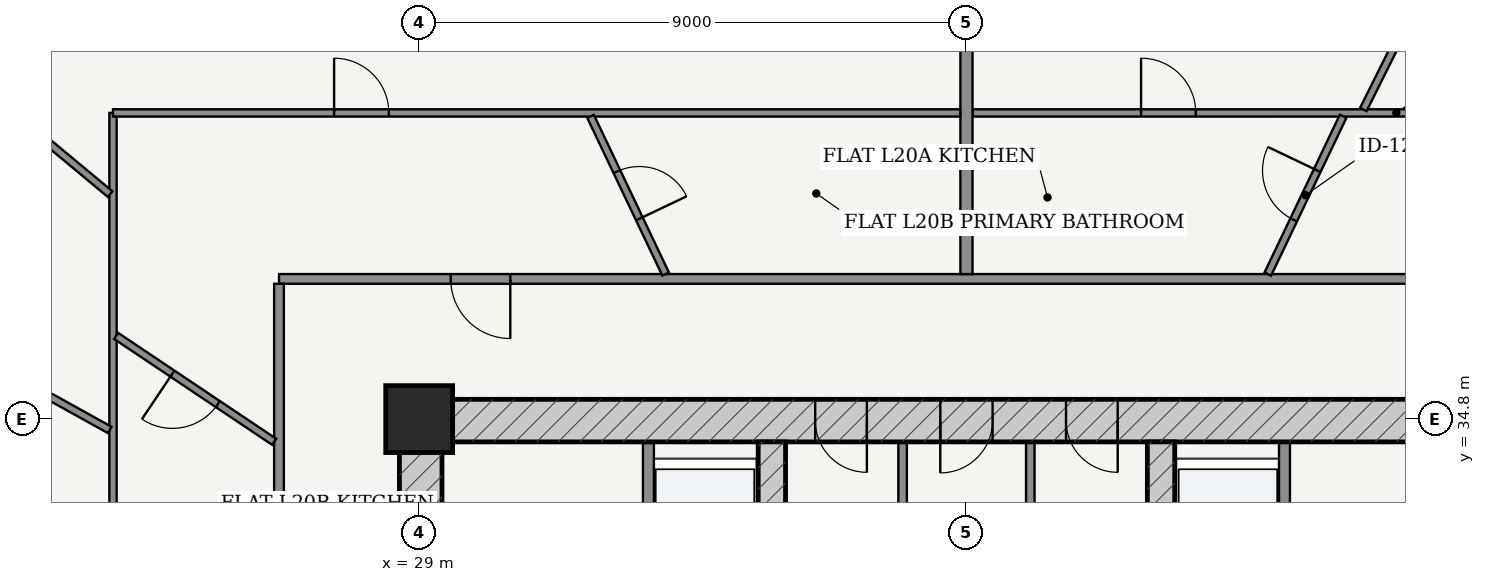
"""IFC4 building model, lengths in metres.
Left out: names, types, materials, properties, quantities, classifications, styles, units other than length and angle.
Written with IfcOpenShell. Run it as: python <this file> out.ifc"""

import sys

from ifc_helpers import new_model, si_unit, direction, frame, frame_2d, origin, origin_2d, place, context, subcontext, project, spatial, rectangle, extrude, source, transform, mapped, element, fill, save


model = new_model("IFC4")
c1 = context("Model", 3, precision=1e-05, world=origin(), true_north=direction((-0.2419218956, 0.970295726276)))
c2 = subcontext(c1, "Body", "Model", "MODEL_VIEW")
j1 = project(units=[si_unit("LENGTHUNIT", "METRE"), si_unit("PLANEANGLEUNIT", "RADIAN")], contexts=[c1])
p1 = place(None, origin())
s1 = spatial("IfcSite", under=j1, at=p1, CompositionType="ELEMENT")
p2 = place(p1, origin())
s2 = spatial("IfcBuilding", under=s1, at=p2, CompositionType="ELEMENT")
p3 = place(p2, frame((0.0, 0.0, 79.8)))
s3 = spatial("IfcBuildingStorey", under=s2, at=p3, CompositionType="ELEMENT", Elevation=79.8)
p4 = place(p3, frame((29.0, 34.8, 0.0), z_axis=(0.0, 0.0, 1.0), x_axis=(1.0, 0.0, 0.0)))
e1 = element("IfcColumn", 1, at=p4, inside=s3, PredefinedType="COLUMN", context=c2, shape_type="SweptSolid", body=[
    extrude(rectangle(XDim=1.1, YDim=1.1, at=origin_2d()), origin(), (0.0, 0.0, 1.0), 3.6),
])
p5 = place(p3, frame((28.675, 34.775, 0.0), z_axis=(0.0, 0.0, 1.0), x_axis=(1.0, 0.0, 0.0)))
e2 = element("IfcWall", 2, at=p5, inside=s3, PredefinedType="SHEAR", context=c2, shape_type="SweptSolid", body=[
    extrude(rectangle(XDim=18.65, YDim=0.7, at=frame_2d((9.325, 0.0))), origin(), (0.0, 0.0, 1.0), 3.325),
])
p6 = place(p5, frame((6.837, 0.0, 0.0)))
e3 = element("IfcOpeningElement", 3, at=p6, cuts=e2, PredefinedType="OPENING", context=c2, shape_type="SweptSolid", body=[
    extrude(rectangle(XDim=0.85, YDim=2.1, at=frame_2d((0.425, 1.05))), frame((0.0, 0.36, 0.0), z_axis=(0.0, -1.0, 0.0), x_axis=(1.0, 0.0, 0.0)), (0.0, 0.0, 1.0), 0.72),
])
p7 = place(p5, frame((8.895, 0.0, 0.0)))
e4 = element("IfcOpeningElement", 4, at=p7, cuts=e2, PredefinedType="OPENING", context=c2, shape_type="SweptSolid", body=[
    extrude(rectangle(XDim=0.86, YDim=2.1, at=frame_2d((0.43, 1.05))), frame((0.0, 0.36, 0.0), z_axis=(0.0, -1.0, 0.0), x_axis=(1.0, 0.0, 0.0)), (0.0, 0.0, 1.0), 0.72),
])
p8 = place(p5, frame((10.962, 0.0, 0.0)))
e5 = element("IfcOpeningElement", 5, at=p8, cuts=e2, PredefinedType="OPENING", context=c2, shape_type="SweptSolid", body=[
    extrude(rectangle(XDim=0.85, YDim=2.1, at=frame_2d((0.425, 1.05))), frame((0.0, 0.36, 0.0), z_axis=(0.0, -1.0, 0.0), x_axis=(1.0, 0.0, 0.0)), (0.0, 0.0, 1.0), 0.72),
])
p9 = place(p3, frame((29.025, 19.175, 0.0), z_axis=(0.0, 0.0, 1.0), x_axis=(0.0, 1.0, 0.0)))
e6 = element("IfcWall", 6, at=p9, inside=s3, PredefinedType="SHEAR", context=c2, shape_type="SweptSolid", body=[
    extrude(rectangle(XDim=15.25, YDim=0.7, at=frame_2d((7.625, 0.0))), origin(), (0.0, 0.0, 1.0), 3.325),
])
p10 = place(p9, frame((9.875, 0.0, 0.0)))
e7 = element("IfcOpeningElement", 7, at=p10, cuts=e6, PredefinedType="OPENING", context=c2, shape_type="SweptSolid", body=[
    extrude(rectangle(XDim=1.5, YDim=2.2, at=frame_2d((0.75, 1.1))), frame((0.0, 0.36, 0.0), z_axis=(0.0, -1.0, 0.0), x_axis=(1.0, 0.0, 0.0)), (0.0, 0.0, 1.0), 0.72),
])
p11 = place(p3, frame((34.8, 19.175, 0.0), z_axis=(0.0, 0.0, 1.0), x_axis=(0.0, 1.0, 0.0)))
e8 = element("IfcWall", 8, at=p11, inside=s3, PredefinedType="SHEAR", context=c2, shape_type="SweptSolid", body=[
    extrude(rectangle(XDim=15.25, YDim=0.45, at=frame_2d((7.625, 0.0))), origin(), (0.0, 0.0, 1.0), 3.325),
])
p12 = place(p11, frame((7.8, 0.0, 0.0)))
e9 = element("IfcOpeningElement", 9, at=p12, cuts=e8, PredefinedType="OPENING", context=c2, shape_type="SweptSolid", body=[
    extrude(rectangle(XDim=1.05, YDim=2.15, at=frame_2d((0.525, 1.075))), frame((0.0, 0.235, 0.0), z_axis=(0.0, -1.0, 0.0), x_axis=(1.0, 0.0, 0.0)), (0.0, 0.0, 1.0), 0.47),
])
p13 = place(p3, frame((41.2, 19.175, 0.0), z_axis=(0.0, 0.0, 1.0), x_axis=(0.0, 1.0, 0.0)))
e10 = element("IfcWall", 10, at=p13, inside=s3, PredefinedType="SHEAR", context=c2, shape_type="SweptSolid", body=[
    extrude(rectangle(XDim=15.25, YDim=0.45, at=frame_2d((7.625, 0.0))), origin(), (0.0, 0.0, 1.0), 3.325),
])
p14 = place(p13, frame((7.8, 0.0, 0.0)))
e11 = element("IfcOpeningElement", 11, at=p14, cuts=e10, PredefinedType="OPENING", context=c2, shape_type="SweptSolid", body=[
    extrude(rectangle(XDim=1.05, YDim=2.15, at=frame_2d((0.525, 1.075))), frame((0.0, 0.235, 0.0), z_axis=(0.0, -1.0, 0.0), x_axis=(1.0, 0.0, 0.0)), (0.0, 0.0, 1.0), 0.47),
])
p15 = place(p3, frame((32.77, 28.52, 0.0), z_axis=(0.0, 0.0, 1.0), x_axis=(0.0, 1.0, 0.0)))
e12 = element("IfcWall", 12, at=p15, inside=s3, PredefinedType="PARTITIONING", context=c2, shape_type="SweptSolid", body=[
    extrude(rectangle(XDim=5.905, YDim=0.18, at=frame_2d((2.953, 0.0))), origin(), (0.0, 0.0, 1.0), 3.325),
])
p16 = place(p15, frame((3.655, 0.0, 0.0)))
e13 = element("IfcOpeningElement", 13, at=p16, cuts=e12, PredefinedType="OPENING", context=c2, shape_type="SweptSolid", body=[
    extrude(rectangle(XDim=1.15, YDim=2.2, at=frame_2d((0.575, 1.1))), frame((0.0, 0.1, 0.0), z_axis=(0.0, -1.0, 0.0), x_axis=(1.0, 0.0, 0.0)), (0.0, 0.0, 1.0), 0.2),
])
p17 = place(p15, frame((0.73, 0.0, 0.0)))
e14 = element("IfcOpeningElement", 14, at=p17, cuts=e12, PredefinedType="OPENING", context=c2, shape_type="SweptSolid", body=[
    extrude(rectangle(XDim=1.2, YDim=2.25, at=frame_2d((0.6, 1.125))), frame((0.0, 0.1, 0.0), z_axis=(0.0, -1.0, 0.0), x_axis=(1.0, 0.0, 0.0)), (0.0, 0.0, 1.0), 0.2),
])
p18 = place(p3, frame((43.23, 28.52, 0.0), z_axis=(0.0, 0.0, 1.0), x_axis=(0.0, 1.0, 0.0)))
e15 = element("IfcWall", 15, at=p18, inside=s3, PredefinedType="PARTITIONING", context=c2, shape_type="SweptSolid", body=[
    extrude(rectangle(XDim=5.905, YDim=0.18, at=frame_2d((2.953, 0.0))), origin(), (0.0, 0.0, 1.0), 3.325),
])
p19 = place(p18, frame((0.905, 0.0, 0.0)))
e16 = element("IfcOpeningElement", 16, at=p19, cuts=e15, PredefinedType="OPENING", context=c2, shape_type="SweptSolid", body=[
    extrude(rectangle(XDim=0.85, YDim=2.1, at=frame_2d((0.425, 1.05))), frame((0.0, 0.1, 0.0), z_axis=(0.0, -1.0, 0.0), x_axis=(1.0, 0.0, 0.0)), (0.0, 0.0, 1.0), 0.2),
])
p20 = place(p18, frame((3.655, 0.0, 0.0)))
e17 = element("IfcOpeningElement", 17, at=p20, cuts=e15, PredefinedType="OPENING", context=c2, shape_type="SweptSolid", body=[
    extrude(rectangle(XDim=1.15, YDim=2.2, at=frame_2d((0.575, 1.1))), frame((0.0, 0.1, 0.0), z_axis=(0.0, -1.0, 0.0), x_axis=(1.0, 0.0, 0.0)), (0.0, 0.0, 1.0), 0.2),
])
for number, where, z_axis, x_axis in (
    (18, (36.95, 31.2, 0.0), (0.0, 0.0, 1.0), (0.0, 1.0, 0.0)),
    (19, (39.05, 31.2, 0.0), (0.0, 0.0, 1.0), (0.0, 1.0, 0.0)),
):
    element("IfcWall", number, at=place(p3, frame(where, z_axis=z_axis, x_axis=x_axis)), inside=s3, PredefinedType="PARTITIONING", context=c2, shape_type="SweptSolid", body=[
        extrude(rectangle(XDim=3.225, YDim=0.14, at=frame_2d((1.613, 0.0))), origin(), (0.0, 0.0, 1.0), 3.325),
    ])
p21 = place(p3, frame((26.695, 37.105, 0.0), z_axis=(0.0, 0.0, 1.0), x_axis=(1.0, 0.0, 0.0)))
e20 = element("IfcWall", 20, at=p21, inside=s3, PredefinedType="PARTITIONING", context=c2, shape_type="SweptSolid", body=[
    extrude(rectangle(XDim=22.61, YDim=0.16, at=frame_2d((11.305, 0.0))), origin(), (0.0, 0.0, 1.0), 2.767),
])
p22 = place(p21, frame((18.812, 0.0, 0.0)))
e21 = element("IfcOpeningElement", 21, at=p22, cuts=e20, PredefinedType="OPENING", context=c2, shape_type="SweptSolid", body=[
    extrude(rectangle(XDim=0.98, YDim=2.2, at=frame_2d((0.49, 1.1))), frame((0.0, 0.09, 0.0), z_axis=(0.0, -1.0, 0.0), x_axis=(1.0, 0.0, 0.0)), (0.0, 0.0, 1.0), 0.18),
])
p23 = place(p21, frame((2.823, 0.0, 0.0)))
e22 = element("IfcOpeningElement", 22, at=p23, cuts=e20, PredefinedType="OPENING", context=c2, shape_type="SweptSolid", body=[
    extrude(rectangle(XDim=0.98, YDim=2.2, at=frame_2d((0.49, 1.1))), frame((0.0, 0.09, 0.0), z_axis=(0.0, -1.0, 0.0), x_axis=(1.0, 0.0, 0.0)), (0.0, 0.0, 1.0), 0.18),
])
p24 = place(p3, frame((26.695, 16.575, 0.0), z_axis=(0.0, 0.0, 1.0), x_axis=(0.0, 1.0, 0.0)))
e23 = element("IfcWall", 23, at=p24, inside=s3, PredefinedType="PARTITIONING", context=c2, shape_type="SweptSolid", body=[
    extrude(rectangle(XDim=20.45, YDim=0.16, at=frame_2d((10.225, 0.0))), origin(), (0.0, 0.0, 1.0), 2.767),
])
p25 = place(p24, frame((1.977, 0.0, 0.0)))
e24 = element("IfcOpeningElement", 24, at=p25, cuts=e23, PredefinedType="OPENING", context=c2, shape_type="SweptSolid", body=[
    extrude(rectangle(XDim=0.98, YDim=2.2, at=frame_2d((0.49, 1.1))), frame((0.0, 0.09, 0.0), z_axis=(0.0, -1.0, 0.0), x_axis=(1.0, 0.0, 0.0)), (0.0, 0.0, 1.0), 0.18),
])
p26 = place(p3, frame((38.102, 39.835, 0.0), z_axis=(0.0, 0.0, 1.0), x_axis=(1.0, 0.0, 0.0)))
e25 = element("IfcWall", 25, at=p26, inside=s3, PredefinedType="PARTITIONING", context=c2, shape_type="SweptSolid", body=[
    extrude(rectangle(XDim=13.933, YDim=0.12, at=frame_2d((6.966, 0.0))), origin(), (0.0, 0.0, 1.0), 2.767),
])
p27 = place(p26, frame((2.769, 0.0, 0.0)))
e26 = element("IfcOpeningElement", 26, at=p27, cuts=e25, PredefinedType="OPENING", context=c2, shape_type="SweptSolid", body=[
    extrude(rectangle(XDim=0.9, YDim=2.15, at=frame_2d((0.45, 1.075))), frame((0.0, 0.07, 0.0), z_axis=(0.0, -1.0, 0.0), x_axis=(1.0, 0.0, 0.0)), (0.0, 0.0, 1.0), 0.14),
])
p28 = place(p3, frame((44.526, 39.89, 0.0), z_axis=(0.0, 0.0, 1.0), x_axis=(0.446167584581, 0.894949432353, 0.0)))
e27 = element("IfcWall", 27, at=p28, inside=s3, PredefinedType="PARTITIONING", context=c2, shape_type="SweptSolid", body=[
    extrude(rectangle(XDim=8.125, YDim=0.12, at=frame_2d((4.062, 0.0))), origin(), (0.0, 0.0, 1.0), 2.767),
])
p29 = place(p28, frame((3.612, 0.0, 0.0)))
e28 = element("IfcOpeningElement", 28, at=p29, cuts=e27, PredefinedType="OPENING", context=c2, shape_type="SweptSolid", body=[
    extrude(rectangle(XDim=0.9, YDim=2.15, at=frame_2d((0.45, 1.075))), frame((0.0, 0.07, 0.0), z_axis=(0.0, -1.0, 0.0), x_axis=(1.0, 0.0, 0.0)), (0.0, 0.0, 1.0), 0.14),
])
p30 = place(p3, frame((42.956, 37.185, 0.0), z_axis=(0.0, 0.0, 1.0), x_axis=(0.430728013923, 0.902481788194, 0.0)))
e29 = element("IfcWall", 29, at=p30, inside=s3, PredefinedType="PARTITIONING", context=c2, shape_type="SweptSolid", body=[
    extrude(rectangle(XDim=2.874, YDim=0.12, at=frame_2d((1.437, 0.0))), origin(), (0.0, 0.0, 1.0), 3.325),
])
p31 = place(p30, frame((0.987, 0.0, 0.0)))
e30 = element("IfcOpeningElement", 30, at=p31, cuts=e29, PredefinedType="OPENING", context=c2, shape_type="SweptSolid", body=[
    extrude(rectangle(XDim=0.9, YDim=2.15, at=frame_2d((0.45, 1.075))), frame((0.0, 0.07, 0.0), z_axis=(0.0, -1.0, 0.0), x_axis=(1.0, 0.0, 0.0)), (0.0, 0.0, 1.0), 0.14),
])
p32 = place(p3, frame((38.0, 37.185, 0.0), z_axis=(0.0, 0.0, 1.0), x_axis=(0.0, 1.0, 0.0)))
e31 = element("IfcWall", 31, at=p32, inside=s3, PredefinedType="PARTITIONING", context=c2, shape_type="SweptSolid", body=[
    extrude(rectangle(XDim=11.655, YDim=0.2, at=frame_2d((5.828, 0.0))), origin(), (0.0, 0.0, 1.0), 2.767),
])
p33 = place(p3, frame((23.965, 24.583, 0.0), z_axis=(0.0, 0.0, 1.0), x_axis=(0.0, 1.0, 0.0)))
e32 = element("IfcWall", 32, at=p33, inside=s3, PredefinedType="PARTITIONING", context=c2, shape_type="SweptSolid", body=[
    extrude(rectangle(XDim=15.252, YDim=0.12, at=frame_2d((7.626, 0.0))), origin(), (0.0, 0.0, 1.0), 2.767),
])
p34 = place(p3, frame((23.965, 39.835, 0.0), z_axis=(0.0, 0.0, 1.0), x_axis=(1.0, 0.0, 0.0)))
e33 = element("IfcWall", 33, at=p34, inside=s3, PredefinedType="PARTITIONING", context=c2, shape_type="SweptSolid", body=[
    extrude(rectangle(XDim=13.933, YDim=0.12, at=frame_2d((6.966, 0.0))), origin(), (0.0, 0.0, 1.0), 2.767),
])
p35 = place(p34, frame((3.636, 0.0, 0.0)))
e34 = element("IfcOpeningElement", 34, at=p35, cuts=e33, PredefinedType="OPENING", context=c2, shape_type="SweptSolid", body=[
    extrude(rectangle(XDim=0.9, YDim=2.15, at=frame_2d((0.45, 1.075))), frame((0.0, 0.07, 0.0), z_axis=(0.0, -1.0, 0.0), x_axis=(1.0, 0.0, 0.0)), (0.0, 0.0, 1.0), 0.14),
])
p36 = place(p3, frame((23.917, 38.5, 0.0), z_axis=(0.0, 0.0, 1.0), x_axis=(-0.769161827891, 0.63905405289, 0.0)))
e35 = element("IfcWall", 35, at=p36, inside=s3, PredefinedType="PARTITIONING", context=c2, shape_type="SweptSolid", body=[
    extrude(rectangle(XDim=6.08, YDim=0.12, at=frame_2d((3.04, 0.0))), origin(), (0.0, 0.0, 1.0), 2.767),
])
p37 = place(p36, frame((2.59, 0.0, 0.0)))
e36 = element("IfcOpeningElement", 36, at=p37, cuts=e35, PredefinedType="OPENING", context=c2, shape_type="SweptSolid", body=[
    extrude(rectangle(XDim=0.9, YDim=2.15, at=frame_2d((0.45, 1.075))), frame((0.0, 0.07, 0.0), z_axis=(0.0, -1.0, 0.0), x_axis=(1.0, 0.0, 0.0)), (0.0, 0.0, 1.0), 0.14),
])
p38 = place(p3, frame((23.911, 34.622, 0.0), z_axis=(0.0, 0.0, 1.0), x_axis=(-0.874324904351, 0.485341077626, 0.0)))
e37 = element("IfcWall", 37, at=p38, inside=s3, PredefinedType="PARTITIONING", context=c2, shape_type="SweptSolid", body=[
    extrude(rectangle(XDim=9.066, YDim=0.12, at=frame_2d((4.533, 0.0))), origin(), (0.0, 0.0, 1.0), 2.767),
])
p39 = place(p38, frame((3.016, 0.0, 0.0)))
e38 = element("IfcOpeningElement", 38, at=p39, cuts=e37, PredefinedType="OPENING", context=c2, shape_type="SweptSolid", body=[
    extrude(rectangle(XDim=0.9, YDim=2.15, at=frame_2d((0.45, 1.075))), frame((0.0, 0.07, 0.0), z_axis=(0.0, -1.0, 0.0), x_axis=(1.0, 0.0, 0.0)), (0.0, 0.0, 1.0), 0.14),
])
p40 = place(p3, frame((23.906, 31.65, 0.0), z_axis=(0.0, 0.0, 1.0), x_axis=(-0.945573120726, 0.32540970078, 0.0)))
e39 = element("IfcWall", 39, at=p40, inside=s3, PredefinedType="PARTITIONING", context=c2, shape_type="SweptSolid", body=[
    extrude(rectangle(XDim=11.022, YDim=0.12, at=frame_2d((5.511, 0.0))), origin(), (0.0, 0.0, 1.0), 2.767),
])
p41 = place(p40, frame((5.061, 0.0, 0.0)))
e40 = element("IfcOpeningElement", 40, at=p41, cuts=e39, PredefinedType="OPENING", context=c2, shape_type="SweptSolid", body=[
    extrude(rectangle(XDim=0.9, YDim=2.15, at=frame_2d((0.45, 1.075))), frame((0.0, 0.07, 0.0), z_axis=(0.0, -1.0, 0.0), x_axis=(1.0, 0.0, 0.0)), (0.0, 0.0, 1.0), 0.14),
])
p42 = place(p3, frame((33.053, 37.185, 0.0), z_axis=(0.0, 0.0, 1.0), x_axis=(-0.429966564324, 0.902844811451, 0.0)))
e41 = element("IfcWall", 41, at=p42, inside=s3, PredefinedType="PARTITIONING", context=c2, shape_type="SweptSolid", body=[
    extrude(rectangle(XDim=2.873, YDim=0.12, at=frame_2d((1.437, 0.0))), origin(), (0.0, 0.0, 1.0), 3.325),
])
p43 = place(p42, frame((1.007, 0.0, 0.0)))
e42 = element("IfcOpeningElement", 42, at=p43, cuts=e41, PredefinedType="OPENING", context=c2, shape_type="SweptSolid", body=[
    extrude(rectangle(XDim=0.86, YDim=2.15, at=frame_2d((0.43, 1.075))), frame((0.0, 0.07, 0.0), z_axis=(0.0, -1.0, 0.0), x_axis=(1.0, 0.0, 0.0)), (0.0, 0.0, 1.0), 0.14),
])
p44 = place(p3, frame((26.615, 34.427, 0.0), z_axis=(0.0, 0.0, 1.0), x_axis=(-0.830799215213, 0.556572245088, 0.0)))
e43 = element("IfcWall", 43, at=p44, inside=s3, PredefinedType="PARTITIONING", context=c2, shape_type="SweptSolid", body=[
    extrude(rectangle(XDim=3.128, YDim=0.12, at=frame_2d((1.564, 0.0))), origin(), (0.0, 0.0, 1.0), 3.004),
])
p45 = place(p44, frame((1.114, 0.0, 0.0)))
e44 = element("IfcOpeningElement", 44, at=p45, cuts=e43, PredefinedType="OPENING", context=c2, shape_type="SweptSolid", body=[
    extrude(rectangle(XDim=0.9, YDim=2.15, at=frame_2d((0.45, 1.075))), frame((0.0, 0.07, 0.0), z_axis=(0.0, -1.0, 0.0), x_axis=(1.0, 0.0, 0.0)), (0.0, 0.0, 1.0), 0.14),
])
m1 = source(origin(), c2, "Body", "SweptSolid", [
    extrude(rectangle(XDim=0.85, YDim=2.1, at=frame_2d((0.425, 1.05))), frame((0.0, 0.025, 0.0), z_axis=(0.0, -1.0, 0.0), x_axis=(1.0, 0.0, 0.0)), (0.0, 0.0, 1.0), 0.05),
])
p46 = place(p6, frame((0.85, 0.0, 0.0), z_axis=(0.0, 0.0, 1.0), x_axis=(-1.0, 0.0, 0.0)))
e45 = element("IfcDoor", 45, at=p46, inside=s3, OperationType="SINGLE_SWING_LEFT", PredefinedType="DOOR", context=c2, shape_type="MappedRepresentation", body=[
    mapped(m1, transform((0.0, 0.0, 0.0), scale=1.0)),
])
fill(e3, e45)
m2 = source(origin(), c2, "Body", "SweptSolid", [
    extrude(rectangle(XDim=0.86, YDim=2.1, at=frame_2d((0.43, 1.05))), frame((0.0, 0.025, 0.0), z_axis=(0.0, -1.0, 0.0), x_axis=(1.0, 0.0, 0.0)), (0.0, 0.0, 1.0), 0.05),
])
p47 = place(p7, frame((0.86, 0.0, 0.0), z_axis=(0.0, 0.0, 1.0), x_axis=(-1.0, 0.0, 0.0)))
e46 = element("IfcDoor", 46, at=p47, inside=s3, OperationType="SINGLE_SWING_RIGHT", PredefinedType="DOOR", context=c2, shape_type="MappedRepresentation", body=[
    mapped(m2, transform((0.0, 0.0, 0.0), scale=1.0)),
])
fill(e4, e46)
p48 = place(p8, frame((0.85, 0.0, 0.0), z_axis=(0.0, 0.0, 1.0), x_axis=(-1.0, 0.0, 0.0)))
e47 = element("IfcDoor", 47, at=p48, inside=s3, OperationType="SINGLE_SWING_LEFT", PredefinedType="DOOR", context=c2, shape_type="MappedRepresentation", body=[
    mapped(m1, transform((0.0, 0.0, 0.0), scale=1.0)),
])
fill(e5, e47)
m3 = source(origin(), c2, "Body", "SweptSolid", [
    extrude(rectangle(XDim=0.9, YDim=2.15, at=frame_2d((0.45, 1.075))), frame((0.0, 0.025, 0.0), z_axis=(0.0, -1.0, 0.0), x_axis=(1.0, 0.0, 0.0)), (0.0, 0.0, 1.0), 0.05),
])
p49 = place(p31, origin())
e48 = element("IfcDoor", 48, at=p49, inside=s3, OperationType="SINGLE_SWING_RIGHT", PredefinedType="DOOR", context=c2, shape_type="MappedRepresentation", body=[
    mapped(m3, transform((0.0, 0.0, 0.0), scale=1.0)),
])
fill(e30, e48)
p50 = place(p27, origin())
e49 = element("IfcDoor", 49, at=p50, inside=s3, OperationType="SINGLE_SWING_LEFT", PredefinedType="DOOR", context=c2, shape_type="MappedRepresentation", body=[
    mapped(m3, transform((0.0, 0.0, 0.0), scale=1.0)),
])
fill(e26, e49)
m4 = source(origin(), c2, "Body", "SweptSolid", [
    extrude(rectangle(XDim=0.98, YDim=2.2, at=frame_2d((0.49, 1.1))), frame((0.0, 0.025, 0.0), z_axis=(0.0, -1.0, 0.0), x_axis=(1.0, 0.0, 0.0)), (0.0, 0.0, 1.0), 0.05),
])
p51 = place(p23, frame((0.98, 0.0, 0.0), z_axis=(0.0, 0.0, 1.0), x_axis=(-1.0, 0.0, 0.0)))
e50 = element("IfcDoor", 50, at=p51, inside=s3, OperationType="SINGLE_SWING_LEFT", PredefinedType="DOOR", context=c2, shape_type="MappedRepresentation", body=[
    mapped(m4, transform((0.0, 0.0, 0.0), scale=1.0)),
])
fill(e22, e50)
m5 = source(origin(), c2, "Body", "SweptSolid", [
    extrude(rectangle(XDim=0.86, YDim=2.15, at=frame_2d((0.43, 1.075))), frame((0.0, 0.025, 0.0), z_axis=(0.0, -1.0, 0.0), x_axis=(1.0, 0.0, 0.0)), (0.0, 0.0, 1.0), 0.05),
])
p52 = place(p43, frame((0.86, 0.0, 0.0), z_axis=(0.0, 0.0, 1.0), x_axis=(-1.0, 0.0, 0.0)))
e51 = element("IfcDoor", 51, at=p52, inside=s3, OperationType="SINGLE_SWING_RIGHT", PredefinedType="DOOR", context=c2, shape_type="MappedRepresentation", body=[
    mapped(m5, transform((0.0, 0.0, 0.0), scale=1.0)),
])
fill(e42, e51)
p53 = place(p35, origin())
e52 = element("IfcDoor", 52, at=p53, inside=s3, OperationType="SINGLE_SWING_LEFT", PredefinedType="DOOR", context=c2, shape_type="MappedRepresentation", body=[
    mapped(m3, transform((0.0, 0.0, 0.0), scale=1.0)),
])
fill(e34, e52)
p54 = place(p45, origin())
e53 = element("IfcDoor", 53, at=p54, inside=s3, OperationType="SINGLE_SWING_RIGHT", PredefinedType="DOOR", context=c2, shape_type="MappedRepresentation", body=[
    mapped(m3, transform((0.0, 0.0, 0.0), scale=1.0)),
])
fill(e44, e53)
save(model, sys.argv[1])
